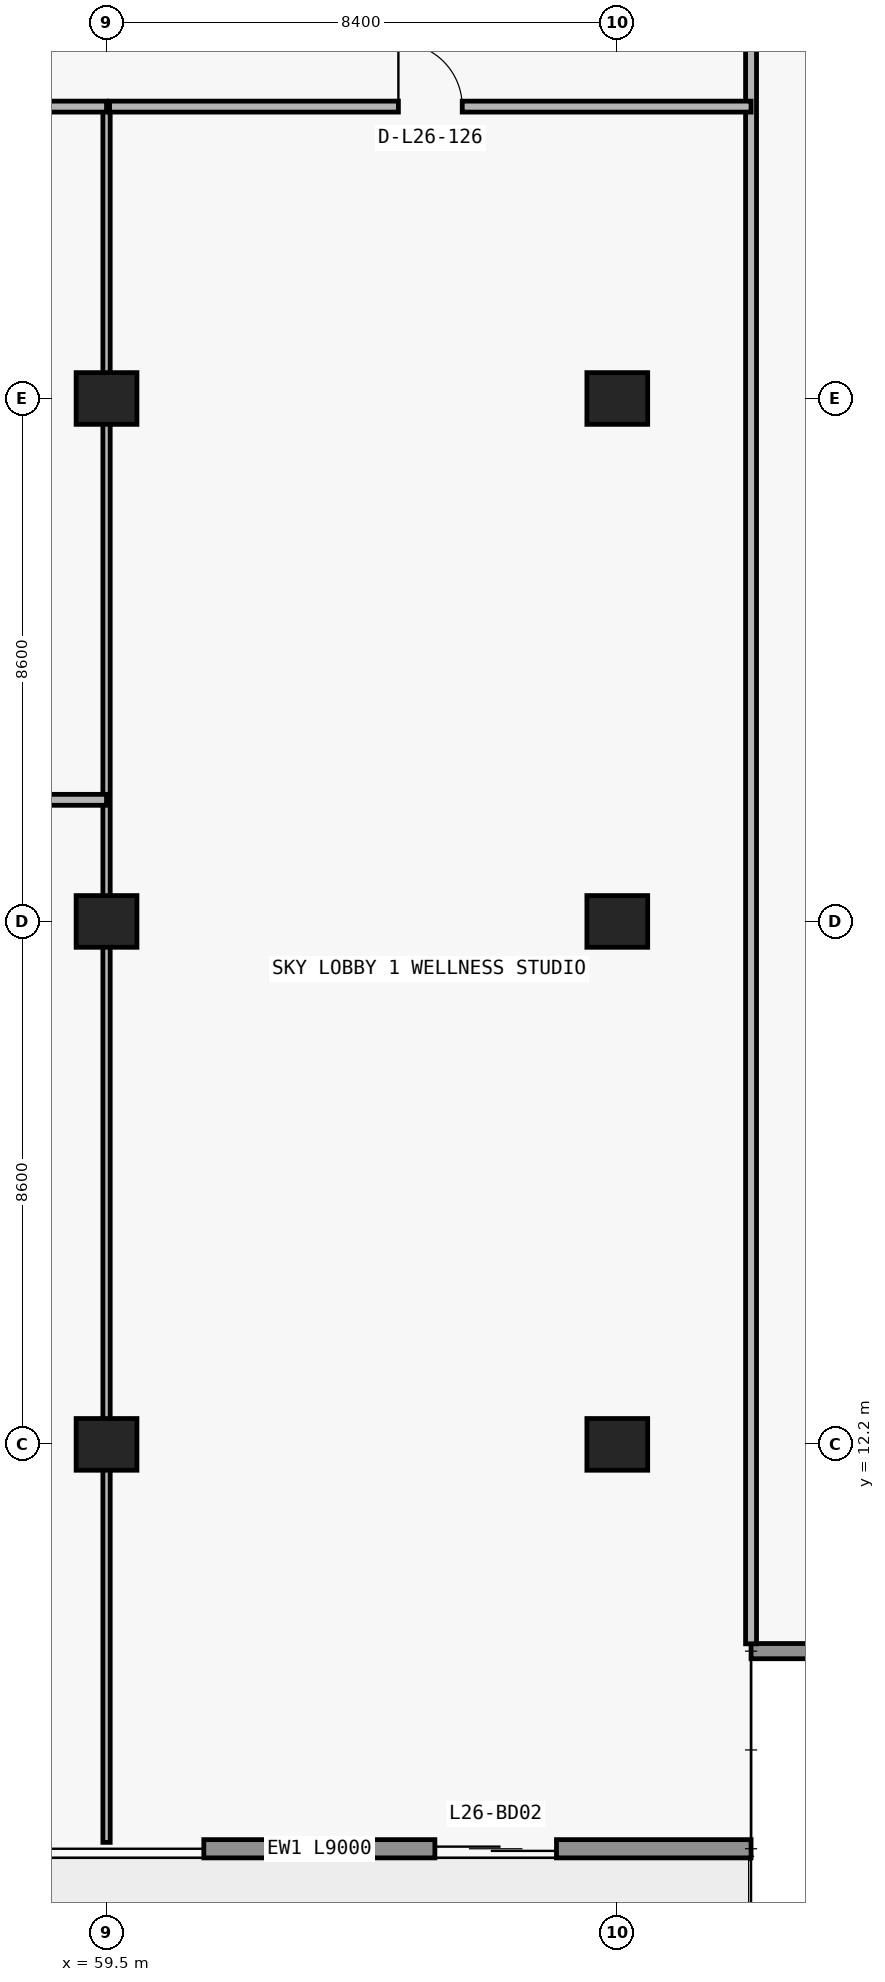
"""IFC4 building model, lengths in metres.
Left out: names, types, materials, properties, quantities, classifications, styles, units other than length and angle.
Written with IfcOpenShell. Run it as: python <this file> out.ifc"""

import sys

from ifc_helpers import new_model, si_unit, direction, frame, frame_2d, origin, origin_2d, place, context, subcontext, project, spatial, rectangle, extrude, element, fill, save


model = new_model("IFC4")
c1 = context("Model", 3, precision=1e-05, world=origin(), true_north=direction((0.0, 1.0)))
c2 = subcontext(c1, "Body", "Model", "MODEL_VIEW")
j1 = project(units=[si_unit("LENGTHUNIT", "METRE"), si_unit("PLANEANGLEUNIT", "RADIAN")], contexts=[c1])
p1 = place(None, origin())
s1 = spatial("IfcSite", under=j1, at=p1, CompositionType="ELEMENT")
p2 = place(p1, origin())
s2 = spatial("IfcBuilding", under=s1, at=p2, CompositionType="ELEMENT")
p3 = place(p2, frame((0.0, 0.0, 97.8)))
s3 = spatial("IfcBuildingStorey", under=s2, at=p3, CompositionType="ELEMENT", Elevation=97.8)
for number, where, z_axis, x_axis in (
    (1, (59.5, 12.2, 0.0), (0.0, 0.0, 1.0), (1.0, 0.0, 0.0)),
    (2, (67.9, 12.2, 0.0), (0.0, 0.0, 1.0), (1.0, 0.0, 0.0)),
    (3, (59.5, 20.8, 0.0), (0.0, 0.0, 1.0), (1.0, 0.0, 0.0)),
    (4, (67.9, 20.8, 0.0), (0.0, 0.0, 1.0), (1.0, 0.0, 0.0)),
    (5, (59.5, 29.4, 0.0), (0.0, 0.0, 1.0), (1.0, 0.0, 0.0)),
    (6, (67.9, 29.4, 0.0), (0.0, 0.0, 1.0), (1.0, 0.0, 0.0)),
):
    element("IfcColumn", number, at=place(p3, frame(where, z_axis=z_axis, x_axis=x_axis)), inside=s3, PredefinedType="COLUMN", context=c2, shape_type="SweptSolid", body=[
        extrude(rectangle(XDim=1.0, YDim=0.85, at=origin_2d()), origin(), (0.0, 0.0, 1.0), 4.55),
    ])
p4 = place(p3, frame((70.1, 5.55, 0.0), z_axis=(0.0, 0.0, 1.0), x_axis=(-1.0, 0.0, 0.0)))
e7 = element("IfcWall", 7, at=p4, inside=s3, PredefinedType="STANDARD", context=c2, shape_type="SweptSolid", body=[
    extrude(rectangle(XDim=9.0, YDim=0.3, at=frame_2d((4.5, 0.0))), origin(), (0.0, 0.0, 1.0), 4.55),
])
p5 = place(p4, frame((3.2, 0.0, 0.0)))
e8 = element("IfcOpeningElement", 8, at=p5, cuts=e7, PredefinedType="OPENING", context=c2, shape_type="SweptSolid", body=[
    extrude(rectangle(XDim=2.0, YDim=2.3, at=frame_2d((1.0, 1.15))), frame((0.0, 0.16, 0.0), z_axis=(0.0, -1.0, 0.0), x_axis=(1.0, 0.0, 0.0)), (0.0, 0.0, 1.0), 0.32),
])
p6 = place(p3, frame((70.1, 8.8, 0.0), z_axis=(0.0, 0.0, 1.0), x_axis=(1.0, 0.0, 0.0)))
e9 = element("IfcWall", 9, at=p6, inside=s3, PredefinedType="ELEMENTEDWALL", context=c2, shape_type="SweptSolid", body=[
    extrude(rectangle(XDim=3.65, YDim=0.25, at=frame_2d((1.825, 0.0))), origin(), (0.0, 0.0, 1.0), 4.55),
])
p7 = place(p3, frame((59.5, 5.655, 0.0), z_axis=(0.0, 0.0, 1.0), x_axis=(0.0, 1.0, 0.0)))
e10 = element("IfcWall", 10, at=p7, inside=s3, PredefinedType="PARTITIONING", context=c2, shape_type="SweptSolid", body=[
    extrude(rectangle(XDim=28.545, YDim=0.12, at=frame_2d((14.272, 0.0))), origin(), (0.0, 0.0, 1.0), 3.514),
])
p8 = place(p3, frame((70.1, 8.92, 0.0), z_axis=(0.0, 0.0, 1.0), x_axis=(0.0, 1.0, 0.0)))
e11 = element("IfcWall", 11, at=p8, inside=s3, PredefinedType="PARTITIONING", context=c2, shape_type="SweptSolid", body=[
    extrude(rectangle(XDim=38.16, YDim=0.18, at=frame_2d((19.08, 0.0))), origin(), (0.0, 0.0, 1.0), 4.55),
])
p9 = place(p3, frame((51.37, 22.8, 0.0), z_axis=(0.0, 0.0, 1.0), x_axis=(1.0, 0.0, 0.0)))
e12 = element("IfcWall", 12, at=p9, inside=s3, PredefinedType="PARTITIONING", context=c2, shape_type="SweptSolid", body=[
    extrude(rectangle(XDim=8.13, YDim=0.18, at=frame_2d((4.065, 0.0))), origin(), (0.0, 0.0, 1.0), 4.55),
])
p10 = place(p9, frame((3.565, 0.0, 0.0)))
e13 = element("IfcOpeningElement", 13, at=p10, cuts=e12, PredefinedType="OPENING", context=c2, shape_type="SweptSolid", body=[
    extrude(rectangle(XDim=1.0, YDim=2.2, at=frame_2d((0.5, 1.1))), frame((0.0, 0.1, 0.0), z_axis=(0.0, -1.0, 0.0), x_axis=(1.0, 0.0, 0.0)), (0.0, 0.0, 1.0), 0.2),
])
p11 = place(p3, frame((18.3, 34.2, 0.0), z_axis=(0.0, 0.0, 1.0), x_axis=(1.0, 0.0, 0.0)))
e14 = element("IfcWall", 14, at=p11, inside=s3, PredefinedType="PARTITIONING", context=c2, shape_type="SweptSolid", body=[
    extrude(rectangle(XDim=41.2, YDim=0.18, at=frame_2d((20.6, 0.0))), origin(), (0.0, 0.0, 1.0), 4.55),
])
p12 = place(p11, frame((36.475, 0.0, 0.0)))
e15 = element("IfcOpeningElement", 15, at=p12, cuts=e14, PredefinedType="OPENING", context=c2, shape_type="SweptSolid", body=[
    extrude(rectangle(XDim=1.05, YDim=2.15, at=frame_2d((0.525, 1.075))), frame((0.0, 0.1, 0.0), z_axis=(0.0, -1.0, 0.0), x_axis=(1.0, 0.0, 0.0)), (0.0, 0.0, 1.0), 0.2),
])
p13 = place(p11, frame((3.675, 0.0, 0.0)))
e16 = element("IfcOpeningElement", 16, at=p13, cuts=e14, PredefinedType="OPENING", context=c2, shape_type="SweptSolid", body=[
    extrude(rectangle(XDim=1.05, YDim=2.15, at=frame_2d((0.525, 1.075))), frame((0.0, 0.1, 0.0), z_axis=(0.0, -1.0, 0.0), x_axis=(1.0, 0.0, 0.0)), (0.0, 0.0, 1.0), 0.2),
])
p14 = place(p11, frame((12.075, 0.0, 0.0)))
e17 = element("IfcOpeningElement", 17, at=p14, cuts=e14, PredefinedType="OPENING", context=c2, shape_type="SweptSolid", body=[
    extrude(rectangle(XDim=1.05, YDim=2.15, at=frame_2d((0.525, 1.075))), frame((0.0, 0.1, 0.0), z_axis=(0.0, -1.0, 0.0), x_axis=(1.0, 0.0, 0.0)), (0.0, 0.0, 1.0), 0.2),
])
p15 = place(p11, frame((20.1, 0.0, 0.0)))
e18 = element("IfcOpeningElement", 18, at=p15, cuts=e14, PredefinedType="OPENING", context=c2, shape_type="SweptSolid", body=[
    extrude(rectangle(XDim=1.0, YDim=2.2, at=frame_2d((0.5, 1.1))), frame((0.0, 0.1, 0.0), z_axis=(0.0, -1.0, 0.0), x_axis=(1.0, 0.0, 0.0)), (0.0, 0.0, 1.0), 0.2),
])
p16 = place(p11, frame((28.1, 0.0, 0.0)))
e19 = element("IfcOpeningElement", 19, at=p16, cuts=e14, PredefinedType="OPENING", context=c2, shape_type="SweptSolid", body=[
    extrude(rectangle(XDim=1.0, YDim=2.2, at=frame_2d((0.5, 1.1))), frame((0.0, 0.1, 0.0), z_axis=(0.0, -1.0, 0.0), x_axis=(1.0, 0.0, 0.0)), (0.0, 0.0, 1.0), 0.2),
])
p17 = place(p3, frame((59.55, 34.2, 0.0), z_axis=(0.0, 0.0, 1.0), x_axis=(1.0, 0.0, 0.0)))
e20 = element("IfcWall", 20, at=p17, inside=s3, PredefinedType="PARTITIONING", context=c2, shape_type="SweptSolid", body=[
    extrude(rectangle(XDim=10.55, YDim=0.18, at=frame_2d((5.275, 0.0))), origin(), (0.0, 0.0, 1.0), 4.55),
])
p18 = place(p17, frame((4.75, 0.0, 0.0)))
e21 = element("IfcOpeningElement", 21, at=p18, cuts=e20, PredefinedType="OPENING", context=c2, shape_type="SweptSolid", body=[
    extrude(rectangle(XDim=1.05, YDim=2.15, at=frame_2d((0.525, 1.075))), frame((0.0, 0.1, 0.0), z_axis=(0.0, -1.0, 0.0), x_axis=(1.0, 0.0, 0.0)), (0.0, 0.0, 1.0), 0.2),
])
p19 = place(p5, origin())
e22 = element("IfcDoor", 22, at=p19, inside=s3, OperationType="DOUBLE_DOOR_SLIDING", PredefinedType="DOOR", context=c2, shape_type="SweptSolid", body=[
    extrude(rectangle(XDim=2.0, YDim=2.3, at=frame_2d((1.0, 1.15))), frame((0.0, 0.025, 0.0), z_axis=(0.0, -1.0, 0.0), x_axis=(1.0, 0.0, 0.0)), (0.0, 0.0, 1.0), 0.05),
])
fill(e8, e22)
p20 = place(p18, origin())
e23 = element("IfcDoor", 23, at=p20, inside=s3, OperationType="SINGLE_SWING_LEFT", PredefinedType="DOOR", context=c2, shape_type="SweptSolid", body=[
    extrude(rectangle(XDim=1.05, YDim=2.15, at=frame_2d((0.525, 1.075))), frame((0.0, 0.025, 0.0), z_axis=(0.0, -1.0, 0.0), x_axis=(1.0, 0.0, 0.0)), (0.0, 0.0, 1.0), 0.05),
])
fill(e21, e23)
save(model, sys.argv[1])
